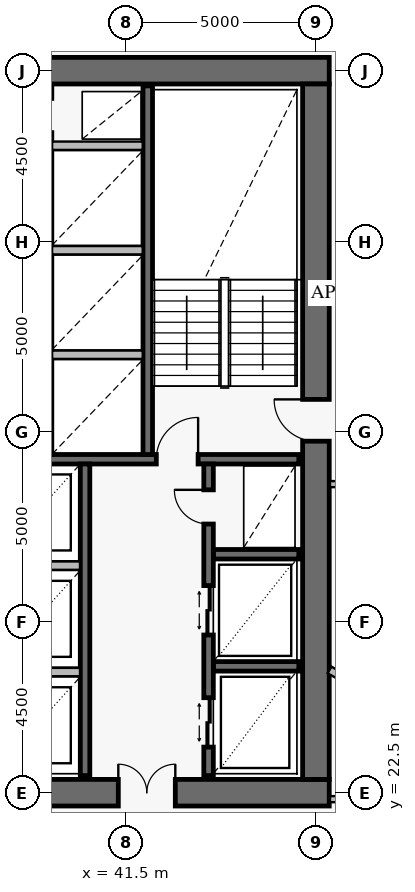
"""IFC4 building model, lengths in metres.
Left out: names, types, materials, properties, quantities, classifications, styles, units other than length and angle.
Written with IfcOpenShell. Run it as: python <this file> out.ifc"""

import sys

from ifc_helpers import new_model, si_unit, direction, frame, frame_2d, origin, place, context, subcontext, project, spatial, rectangle, extrude, element, fill, save


model = new_model("IFC4")
c1 = context("Model", 3, precision=1e-05, world=origin(), true_north=direction((0.0, 1.0)))
c2 = subcontext(c1, "Body", "Model", "MODEL_VIEW")
j1 = project(units=[si_unit("LENGTHUNIT", "METRE"), si_unit("PLANEANGLEUNIT", "RADIAN")], contexts=[c1])
p1 = place(None, origin())
s1 = spatial("IfcSite", under=j1, at=p1, CompositionType="ELEMENT")
p2 = place(p1, origin())
s2 = spatial("IfcBuilding", under=s1, at=p2, CompositionType="ELEMENT")
p3 = place(p2, frame((0.0, 0.0, 150.4)))
s3 = spatial("IfcBuildingStorey", under=s2, at=p3, CompositionType="ELEMENT", Elevation=150.4)
p4 = place(p3, frame((37.35, 22.5, 0.0), z_axis=(0.0, 0.0, 1.0), x_axis=(1.0, 0.0, 0.0)))
e1 = element("IfcWall", 1, at=p4, inside=s3, PredefinedType="SHEAR", context=c2, shape_type="SweptSolid", body=[
    extrude(rectangle(XDim=9.5, YDim=0.7, at=frame_2d((4.75, 0.0))), origin(), (0.0, 0.0, 1.0), 3.8),
])
p5 = place(p4, frame((3.95, 0.0, 0.0)))
e2 = element("IfcOpeningElement", 2, at=p5, cuts=e1, PredefinedType="OPENING", context=c2, shape_type="SweptSolid", body=[
    extrude(rectangle(XDim=1.5, YDim=2.15, at=frame_2d((0.75, 1.075))), frame((0.0, 0.362, 0.0), z_axis=(0.0, -1.0, 0.0), x_axis=(1.0, 0.0, 0.0)), (0.0, 0.0, 1.0), 0.724),
])
p6 = place(p3, frame((46.85, 41.5, 0.0), z_axis=(0.0, 0.0, 1.0), x_axis=(-1.0, 0.0, 0.0)))
e3 = element("IfcWall", 3, at=p6, inside=s3, PredefinedType="SHEAR", context=c2, shape_type="SweptSolid", body=[
    extrude(rectangle(XDim=7.9, YDim=0.7, at=frame_2d((3.95, 0.0))), origin(), (0.0, 0.0, 1.0), 3.8),
])
p7 = place(p3, frame((46.5, 22.85, 0.0), z_axis=(0.0, 0.0, 1.0), x_axis=(0.0, 1.0, 0.0)))
e4 = element("IfcWall", 4, at=p7, inside=s3, PredefinedType="SHEAR", context=c2, shape_type="SweptSolid", body=[
    extrude(rectangle(XDim=18.3, YDim=0.7, at=frame_2d((9.15, 0.0))), origin(), (0.0, 0.0, 1.0), 3.8),
])
p8 = place(p7, frame((8.9, 0.0, 0.0)))
e5 = element("IfcOpeningElement", 5, at=p8, cuts=e4, PredefinedType="OPENING", context=c2, shape_type="SweptSolid", body=[
    extrude(rectangle(XDim=1.1, YDim=2.15, at=frame_2d((0.55, 1.075))), frame((0.0, 0.362, 0.0), z_axis=(0.0, -1.0, 0.0), x_axis=(1.0, 0.0, 0.0)), (0.0, 0.0, 1.0), 0.724),
])
p9 = place(p3, frame((25.95, 31.275, 0.0), z_axis=(0.0, 0.0, 1.0), x_axis=(1.0, 0.0, 0.0)))
e6 = element("IfcWall", 6, at=p9, inside=s3, PredefinedType="SOLIDWALL", context=c2, shape_type="SweptSolid", body=[
    extrude(rectangle(XDim=20.1, YDim=0.25, at=frame_2d((10.05, 0.0))), origin(), (0.0, 0.0, 1.0), 3.8),
])
p10 = place(p9, frame((2.6, 0.0, 0.0)))
e7 = element("IfcOpeningElement", 7, at=p10, cuts=e6, PredefinedType="OPENING", context=c2, shape_type="SweptSolid", body=[
    extrude(rectangle(XDim=1.1, YDim=2.15, at=frame_2d((0.55, 1.075))), frame((0.0, 0.137, 0.0), z_axis=(0.0, -1.0, 0.0), x_axis=(1.0, 0.0, 0.0)), (0.0, 0.0, 1.0), 0.274),
])
p11 = place(p9, frame((10.6, 0.0, 0.0)))
e8 = element("IfcOpeningElement", 8, at=p11, cuts=e6, PredefinedType="OPENING", context=c2, shape_type="SweptSolid", body=[
    extrude(rectangle(XDim=1.1, YDim=2.15, at=frame_2d((0.55, 1.075))), frame((0.0, 0.137, 0.0), z_axis=(0.0, -1.0, 0.0), x_axis=(1.0, 0.0, 0.0)), (0.0, 0.0, 1.0), 0.274),
])
p12 = place(p9, frame((16.35, 0.0, 0.0)))
e9 = element("IfcOpeningElement", 9, at=p12, cuts=e6, PredefinedType="OPENING", context=c2, shape_type="SweptSolid", body=[
    extrude(rectangle(XDim=1.1, YDim=2.15, at=frame_2d((0.55, 1.075))), frame((0.0, 0.137, 0.0), z_axis=(0.0, -1.0, 0.0), x_axis=(1.0, 0.0, 0.0)), (0.0, 0.0, 1.0), 0.274),
])
p13 = place(p3, frame((42.075, 31.4, 0.0), z_axis=(0.0, 0.0, 1.0), x_axis=(0.0, 1.0, 0.0)))
e10 = element("IfcWall", 10, at=p13, inside=s3, PredefinedType="SOLIDWALL", context=c2, shape_type="SweptSolid", body=[
    extrude(rectangle(XDim=9.7, YDim=0.25, at=frame_2d((4.85, 0.0))), origin(), (0.0, 0.0, 1.0), 3.8),
])
p14 = place(p3, frame((40.425, 22.95, 0.0), z_axis=(0.0, 0.0, 1.0), x_axis=(0.0, 1.0, 0.0)))
e11 = element("IfcWall", 11, at=p14, inside=s3, PredefinedType="SOLIDWALL", context=c2, shape_type="SweptSolid", body=[
    extrude(rectangle(XDim=8.2, YDim=0.25, at=frame_2d((4.1, 0.0))), origin(), (0.0, 0.0, 1.0), 3.8),
])
for number, where, z_axis, x_axis in (
    (12, (43.8, 25.825, 0.0), (0.0, 0.0, 1.0), (1.0, 0.0, 0.0)),
    (13, (43.8, 28.775, 0.0), (0.0, 0.0, 1.0), (1.0, 0.0, 0.0)),
):
    element("IfcWall", number, at=place(p3, frame(where, z_axis=z_axis, x_axis=x_axis)), inside=s3, PredefinedType="SOLIDWALL", context=c2, shape_type="SweptSolid", body=[
        extrude(rectangle(XDim=2.25, YDim=0.25, at=frame_2d((1.125, 0.0))), origin(), (0.0, 0.0, 1.0), 3.8),
    ])
p15 = place(p3, frame((43.675, 22.95, 0.0), z_axis=(0.0, 0.0, 1.0), x_axis=(0.0, 1.0, 0.0)))
e14 = element("IfcWall", 14, at=p15, inside=s3, PredefinedType="SOLIDWALL", context=c2, shape_type="SweptSolid", body=[
    extrude(rectangle(XDim=8.2, YDim=0.25, at=frame_2d((4.1, 0.0))), origin(), (0.0, 0.0, 1.0), 3.8),
])
p16 = place(p15, frame((0.75, 0.0, 0.0)))
e15 = element("IfcOpeningElement", 15, at=p16, cuts=e14, PredefinedType="OPENING", context=c2, shape_type="SweptSolid", body=[
    extrude(rectangle(XDim=1.3, YDim=2.3, at=frame_2d((0.65, 1.15))), frame((0.0, 0.137, 0.0), z_axis=(0.0, -1.0, 0.0), x_axis=(1.0, 0.0, 0.0)), (0.0, 0.0, 1.0), 0.274),
])
p17 = place(p15, frame((3.7, 0.0, 0.0)))
e16 = element("IfcOpeningElement", 16, at=p17, cuts=e14, PredefinedType="OPENING", context=c2, shape_type="SweptSolid", body=[
    extrude(rectangle(XDim=1.3, YDim=2.3, at=frame_2d((0.65, 1.15))), frame((0.0, 0.137, 0.0), z_axis=(0.0, -1.0, 0.0), x_axis=(1.0, 0.0, 0.0)), (0.0, 0.0, 1.0), 0.274),
])
p18 = place(p15, frame((6.62, 0.0, 0.0)))
e17 = element("IfcOpeningElement", 17, at=p18, cuts=e14, PredefinedType="OPENING", context=c2, shape_type="SweptSolid", body=[
    extrude(rectangle(XDim=0.9, YDim=2.1, at=frame_2d((0.45, 1.05))), frame((0.0, 0.137, 0.0), z_axis=(0.0, -1.0, 0.0), x_axis=(1.0, 0.0, 0.0)), (0.0, 0.0, 1.0), 0.274),
])
for number, where, z_axis, x_axis in (
    (18, (39.558, 34.025, 0.0), (0.0, 0.0, 1.0), (1.0, 0.0, 0.0)),
    (19, (39.558, 36.775, 0.0), (0.0, 0.0, 1.0), (1.0, 0.0, 0.0)),
    (20, (39.558, 39.525, 0.0), (0.0, 0.0, 1.0), (1.0, 0.0, 0.0)),
):
    element("IfcWall", number, at=place(p3, frame(where, z_axis=z_axis, x_axis=x_axis)), inside=s3, PredefinedType="PARTITIONING", context=c2, shape_type="SweptSolid", body=[
        extrude(rectangle(XDim=2.384, YDim=0.22, at=frame_2d((1.192, 0.0))), origin(), (0.0, 0.0, 1.0), 3.55),
    ])
for number, where, z_axis, x_axis in (
    (21, (38.008, 25.675, 0.0), (0.0, 0.0, 1.0), (1.0, 0.0, 0.0)),
    (22, (38.008, 28.475, 0.0), (0.0, 0.0, 1.0), (1.0, 0.0, 0.0)),
):
    element("IfcWall", number, at=place(p3, frame(where, z_axis=z_axis, x_axis=x_axis)), inside=s3, PredefinedType="PARTITIONING", context=c2, shape_type="SweptSolid", body=[
        extrude(rectangle(XDim=2.284, YDim=0.22, at=frame_2d((1.142, 0.0))), origin(), (0.0, 0.0, 1.0), 3.55),
    ])
p19 = place(p3, frame((46.858, 25.731, 0.0), z_axis=(0.0, 0.0, 1.0), x_axis=(0.866024853997, -0.500000952259, 0.0)))
e23 = element("IfcWall", 23, at=p19, inside=s3, PredefinedType="PARTITIONING", context=c2, shape_type="SweptSolid", body=[
    extrude(rectangle(XDim=14.646, YDim=0.2, at=frame_2d((7.323, 0.0))), origin(), (0.0, 0.0, 1.0), 2.87),
])
p20 = place(p3, frame((51.65, 22.33, 0.0), z_axis=(0.0, 0.0, 1.0), x_axis=(-1.0, 0.0, 0.0)))
e24 = element("IfcWall", 24, at=p20, inside=s3, PredefinedType="PARTITIONING", context=c2, shape_type="SweptSolid", body=[
    extrude(rectangle(XDim=4.78, YDim=0.16, at=frame_2d((2.39, 0.0))), origin(), (0.0, 0.0, 1.0), 3.55),
])
p21 = place(p3, frame((46.87, 30.62, 0.0), z_axis=(0.0, 0.0, 1.0), x_axis=(1.0, 0.0, 0.0)))
e25 = element("IfcWall", 25, at=p21, inside=s3, PredefinedType="PARTITIONING", context=c2, shape_type="SweptSolid", body=[
    extrude(rectangle(XDim=2.03, YDim=0.16, at=frame_2d((1.015, 0.0))), origin(), (0.0, 0.0, 1.0), 3.55),
])
p22 = place(p8, origin())
e26 = element("IfcDoor", 26, at=p22, inside=s3, OperationType="SINGLE_SWING_RIGHT", PredefinedType="USERDEFINED", context=c2, shape_type="SweptSolid", body=[
    extrude(rectangle(XDim=1.1, YDim=2.15, at=frame_2d((0.55, 1.075))), frame((0.0, 0.025, 0.0), z_axis=(0.0, -1.0, 0.0), x_axis=(1.0, 0.0, 0.0)), (0.0, 0.0, 1.0), 0.05),
])
fill(e5, e26)
p23 = place(p5, origin())
e27 = element("IfcDoor", 27, at=p23, inside=s3, OperationType="DOUBLE_DOOR_SINGLE_SWING", PredefinedType="DOOR", context=c2, shape_type="SweptSolid", body=[
    extrude(rectangle(XDim=1.5, YDim=2.15, at=frame_2d((0.75, 1.075))), frame((0.0, 0.025, 0.0), z_axis=(0.0, -1.0, 0.0), x_axis=(1.0, 0.0, 0.0)), (0.0, 0.0, 1.0), 0.05),
])
fill(e2, e27)
p24 = place(p12, origin())
e28 = element("IfcDoor", 28, at=p24, inside=s3, OperationType="SINGLE_SWING_RIGHT", PredefinedType="USERDEFINED", context=c2, shape_type="SweptSolid", body=[
    extrude(rectangle(XDim=1.1, YDim=2.15, at=frame_2d((0.55, 1.075))), frame((0.0, 0.025, 0.0), z_axis=(0.0, -1.0, 0.0), x_axis=(1.0, 0.0, 0.0)), (0.0, 0.0, 1.0), 0.05),
])
fill(e9, e28)
p25 = place(p16, origin())
e29 = element("IfcDoor", 29, at=p25, inside=s3, OperationType="DOUBLE_DOOR_SLIDING", PredefinedType="DOOR", context=c2, shape_type="SweptSolid", body=[
    extrude(rectangle(XDim=1.3, YDim=2.3, at=frame_2d((0.65, 1.15))), frame((0.0, 0.025, 0.0), z_axis=(0.0, -1.0, 0.0), x_axis=(1.0, 0.0, 0.0)), (0.0, 0.0, 1.0), 0.05),
])
fill(e15, e29)
p26 = place(p17, origin())
e30 = element("IfcDoor", 30, at=p26, inside=s3, OperationType="DOUBLE_DOOR_SLIDING", PredefinedType="DOOR", context=c2, shape_type="SweptSolid", body=[
    extrude(rectangle(XDim=1.3, YDim=2.3, at=frame_2d((0.65, 1.15))), frame((0.0, 0.025, 0.0), z_axis=(0.0, -1.0, 0.0), x_axis=(1.0, 0.0, 0.0)), (0.0, 0.0, 1.0), 0.05),
])
fill(e16, e30)
p27 = place(p18, origin())
e31 = element("IfcDoor", 31, at=p27, inside=s3, OperationType="SINGLE_SWING_RIGHT", PredefinedType="DOOR", context=c2, shape_type="SweptSolid", body=[
    extrude(rectangle(XDim=0.9, YDim=2.1, at=frame_2d((0.45, 1.05))), frame((0.0, 0.025, 0.0), z_axis=(0.0, -1.0, 0.0), x_axis=(1.0, 0.0, 0.0)), (0.0, 0.0, 1.0), 0.05),
])
fill(e17, e31)
save(model, sys.argv[1])
